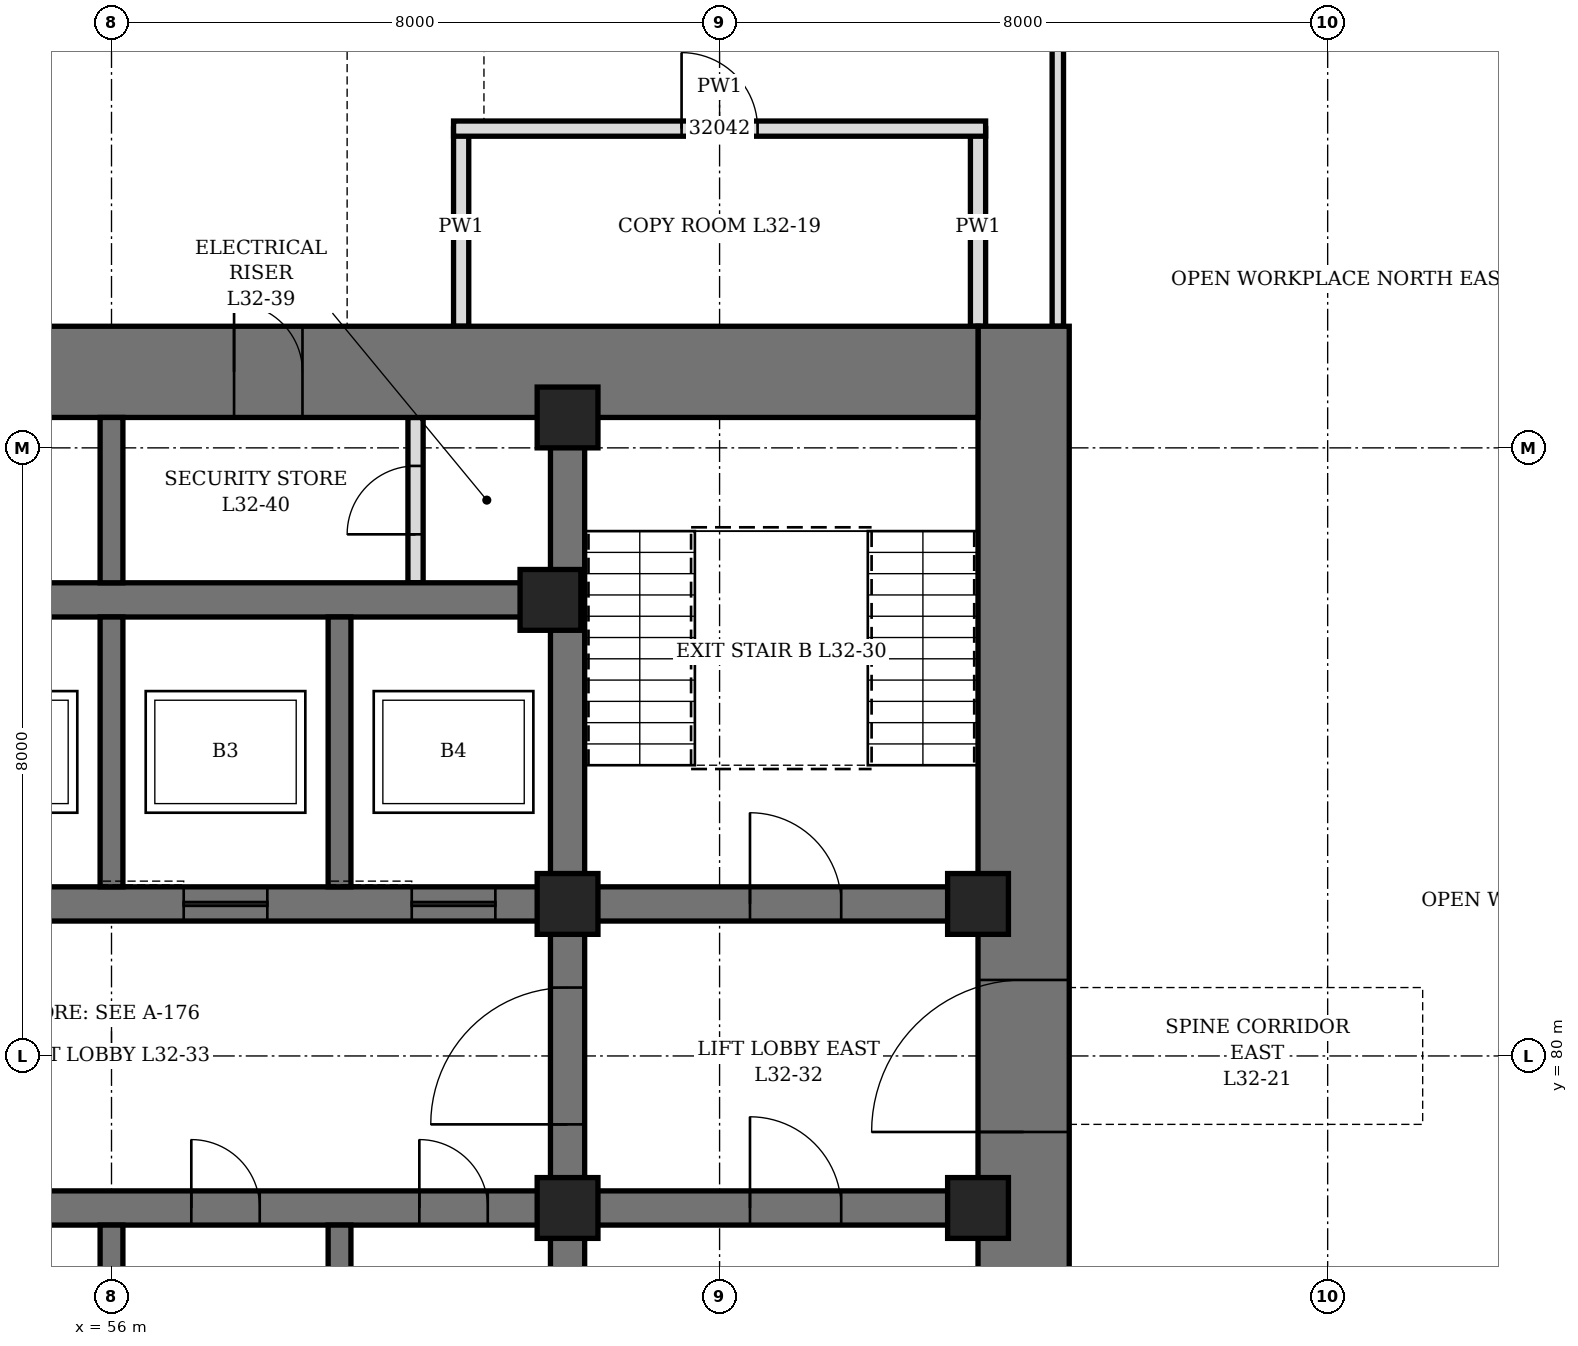
"""IFC4 building model, lengths in metres.
Left out: names, types, materials, properties, quantities, classifications, styles, units other than length and angle.
Written with IfcOpenShell. Run it as: python <this file> out.ifc"""

import sys

from ifc_helpers import new_model, si_unit, direction, frame, frame_2d, origin, origin_2d, place, context, subcontext, project, spatial, rectangle, hollow_rectangle, extrude, element, fill, save


model = new_model("IFC4")
c1 = context("Model", 3, precision=1e-05, world=origin(), true_north=direction((0.0, 1.0)))
c2 = subcontext(c1, "Body", "Model", "MODEL_VIEW")
j1 = project(units=[si_unit("LENGTHUNIT", "METRE"), si_unit("PLANEANGLEUNIT", "RADIAN")], contexts=[c1])
p1 = place(None, origin())
s1 = spatial("IfcSite", under=j1, at=p1, CompositionType="ELEMENT")
p2 = place(p1, origin())
s2 = spatial("IfcBuilding", under=s1, at=p2, CompositionType="ELEMENT")
p3 = place(p2, frame((0.0, 0.0, 145.9)))
s3 = spatial("IfcBuildingStorey", under=s2, at=p3, CompositionType="ELEMENT", Elevation=145.9)
p4 = place(p3, frame((68.0, 70.4, 0.0), z_axis=(0.0, 0.0, 1.0), x_axis=(0.0, 1.0, 0.0)))
e1 = element("IfcWall", 1, at=p4, inside=s3, PredefinedType="SHEAR", context=c2, shape_type="SweptSolid", body=[
    extrude(rectangle(XDim=19.2, YDim=1.2, at=frame_2d((9.6, 0.0))), origin(), (0.0, 0.0, 1.0), 4.2),
])
p5 = place(p4, frame((8.6, 0.0, 0.0)))
e2 = element("IfcOpeningElement", 2, at=p5, cuts=e1, PredefinedType="OPENING", context=c2, shape_type="SweptSolid", body=[
    extrude(rectangle(XDim=2.0, YDim=2.4, at=frame_2d((1.0, 1.2))), frame((0.0, 0.61, 0.0), z_axis=(0.0, -1.0, 0.0), x_axis=(1.0, 0.0, 0.0)), (0.0, 0.0, 1.0), 1.22),
])
p6 = place(p3, frame((44.6, 89.0, 0.0), z_axis=(0.0, 0.0, 1.0), x_axis=(1.0, 0.0, 0.0)))
e3 = element("IfcWall", 3, at=p6, inside=s3, PredefinedType="SHEAR", context=c2, shape_type="SweptSolid", body=[
    extrude(rectangle(XDim=22.8, YDim=1.2, at=frame_2d((11.4, 0.0))), origin(), (0.0, 0.0, 1.0), 4.2),
])
p7 = place(p6, frame((7.9, 0.0, 0.0)))
e4 = element("IfcOpeningElement", 4, at=p7, cuts=e3, PredefinedType="OPENING", context=c2, shape_type="SweptSolid", body=[
    extrude(rectangle(XDim=1.0, YDim=2.1, at=frame_2d((0.5, 1.05))), frame((0.0, 0.61, 0.0), z_axis=(0.0, -1.0, 0.0), x_axis=(1.0, 0.0, 0.0)), (0.0, 0.0, 1.0), 1.22),
])
p8 = place(p6, frame((13.012, 0.0, 0.0)))
e5 = element("IfcOpeningElement", 5, at=p8, cuts=e3, PredefinedType="OPENING", context=c2, shape_type="SweptSolid", body=[
    extrude(rectangle(XDim=0.9, YDim=2.1, at=frame_2d((0.45, 1.05))), frame((0.0, 0.61, 0.0), z_axis=(0.0, -1.0, 0.0), x_axis=(1.0, 0.0, 0.0)), (0.0, 0.0, 1.0), 1.22),
])
p9 = place(p3, frame((62.0, 71.6, 0.0), z_axis=(0.0, 0.0, 1.0), x_axis=(0.0, 1.0, 0.0)))
e6 = element("IfcWall", 6, at=p9, inside=s3, PredefinedType="SHEAR", context=c2, shape_type="SweptSolid", body=[
    extrude(rectangle(XDim=16.8, YDim=0.45, at=frame_2d((8.4, 0.0))), origin(), (0.0, 0.0, 1.0), 4.2),
])
p10 = place(p9, frame((7.5, 0.0, 0.0)))
e7 = element("IfcOpeningElement", 7, at=p10, cuts=e6, PredefinedType="OPENING", context=c2, shape_type="SweptSolid", body=[
    extrude(rectangle(XDim=1.8, YDim=2.4, at=frame_2d((0.9, 1.2))), frame((0.0, 0.235, 0.0), z_axis=(0.0, -1.0, 0.0), x_axis=(1.0, 0.0, 0.0)), (0.0, 0.0, 1.0), 0.47),
])
p11 = place(p3, frame((62.225, 78.0, 0.0), z_axis=(0.0, 0.0, 1.0), x_axis=(1.0, 0.0, 0.0)))
e8 = element("IfcWall", 8, at=p11, inside=s3, PredefinedType="SHEAR", context=c2, shape_type="SweptSolid", body=[
    extrude(rectangle(XDim=5.175, YDim=0.45, at=frame_2d((2.587, 0.0))), origin(), (0.0, 0.0, 1.0), 4.2),
])
p12 = place(p11, frame((2.175, 0.0, 0.0)))
e9 = element("IfcOpeningElement", 9, at=p12, cuts=e8, PredefinedType="OPENING", context=c2, shape_type="SweptSolid", body=[
    extrude(rectangle(XDim=1.2, YDim=2.1, at=frame_2d((0.6, 1.05))), frame((0.0, 0.235, 0.0), z_axis=(0.0, -1.0, 0.0), x_axis=(1.0, 0.0, 0.0)), (0.0, 0.0, 1.0), 0.47),
])
p13 = place(p3, frame((62.225, 82.0, 0.0), z_axis=(0.0, 0.0, 1.0), x_axis=(1.0, 0.0, 0.0)))
e10 = element("IfcWall", 10, at=p13, inside=s3, PredefinedType="SHEAR", context=c2, shape_type="SweptSolid", body=[
    extrude(rectangle(XDim=5.175, YDim=0.45, at=frame_2d((2.587, 0.0))), origin(), (0.0, 0.0, 1.0), 4.2),
])
p14 = place(p13, frame((2.175, 0.0, 0.0)))
e11 = element("IfcOpeningElement", 11, at=p14, cuts=e10, PredefinedType="OPENING", context=c2, shape_type="SweptSolid", body=[
    extrude(rectangle(XDim=1.2, YDim=2.1, at=frame_2d((0.6, 1.05))), frame((0.0, 0.235, 0.0), z_axis=(0.0, -1.0, 0.0), x_axis=(1.0, 0.0, 0.0)), (0.0, 0.0, 1.0), 0.47),
])
p15 = place(p3, frame((50.225, 78.0, 0.0), z_axis=(0.0, 0.0, 1.0), x_axis=(1.0, 0.0, 0.0)))
e12 = element("IfcWall", 12, at=p15, inside=s3, PredefinedType="SHEAR", context=c2, shape_type="SweptSolid", body=[
    extrude(rectangle(XDim=11.55, YDim=0.45, at=frame_2d((5.775, 0.0))), origin(), (0.0, 0.0, 1.0), 4.2),
])
p16 = place(p15, frame((0.825, 0.0, 0.0)))
e13 = element("IfcOpeningElement", 13, at=p16, cuts=e12, PredefinedType="OPENING", context=c2, shape_type="SweptSolid", body=[
    extrude(rectangle(XDim=0.9, YDim=2.1, at=frame_2d((0.45, 1.05))), frame((0.0, 0.235, 0.0), z_axis=(0.0, -1.0, 0.0), x_axis=(1.0, 0.0, 0.0)), (0.0, 0.0, 1.0), 0.47),
])
p17 = place(p15, frame((3.825, 0.0, 0.0)))
e14 = element("IfcOpeningElement", 14, at=p17, cuts=e12, PredefinedType="OPENING", context=c2, shape_type="SweptSolid", body=[
    extrude(rectangle(XDim=0.9, YDim=2.1, at=frame_2d((0.45, 1.05))), frame((0.0, 0.235, 0.0), z_axis=(0.0, -1.0, 0.0), x_axis=(1.0, 0.0, 0.0)), (0.0, 0.0, 1.0), 0.47),
])
p18 = place(p15, frame((6.825, 0.0, 0.0)))
e15 = element("IfcOpeningElement", 15, at=p18, cuts=e12, PredefinedType="OPENING", context=c2, shape_type="SweptSolid", body=[
    extrude(rectangle(XDim=0.9, YDim=2.1, at=frame_2d((0.45, 1.05))), frame((0.0, 0.235, 0.0), z_axis=(0.0, -1.0, 0.0), x_axis=(1.0, 0.0, 0.0)), (0.0, 0.0, 1.0), 0.47),
])
p19 = place(p15, frame((9.825, 0.0, 0.0)))
e16 = element("IfcOpeningElement", 16, at=p19, cuts=e12, PredefinedType="OPENING", context=c2, shape_type="SweptSolid", body=[
    extrude(rectangle(XDim=0.9, YDim=2.1, at=frame_2d((0.45, 1.05))), frame((0.0, 0.235, 0.0), z_axis=(0.0, -1.0, 0.0), x_axis=(1.0, 0.0, 0.0)), (0.0, 0.0, 1.0), 0.47),
])
p20 = place(p3, frame((50.225, 82.0, 0.0), z_axis=(0.0, 0.0, 1.0), x_axis=(1.0, 0.0, 0.0)))
e17 = element("IfcWall", 17, at=p20, inside=s3, PredefinedType="SHEAR", context=c2, shape_type="SweptSolid", body=[
    extrude(rectangle(XDim=11.55, YDim=0.45, at=frame_2d((5.775, 0.0))), origin(), (0.0, 0.0, 1.0), 4.2),
])
p21 = place(p20, frame((0.725, 0.0, 0.0)))
e18 = element("IfcOpeningElement", 18, at=p21, cuts=e17, PredefinedType="OPENING", context=c2, shape_type="SweptSolid", body=[
    extrude(rectangle(XDim=1.1, YDim=2.2, at=frame_2d((0.55, 1.1))), frame((0.0, 0.235, 0.0), z_axis=(0.0, -1.0, 0.0), x_axis=(1.0, 0.0, 0.0)), (0.0, 0.0, 1.0), 0.47),
])
p22 = place(p20, frame((3.725, 0.0, 0.0)))
e19 = element("IfcOpeningElement", 19, at=p22, cuts=e17, PredefinedType="OPENING", context=c2, shape_type="SweptSolid", body=[
    extrude(rectangle(XDim=1.1, YDim=2.2, at=frame_2d((0.55, 1.1))), frame((0.0, 0.235, 0.0), z_axis=(0.0, -1.0, 0.0), x_axis=(1.0, 0.0, 0.0)), (0.0, 0.0, 1.0), 0.47),
])
p23 = place(p20, frame((6.725, 0.0, 0.0)))
e20 = element("IfcOpeningElement", 20, at=p23, cuts=e17, PredefinedType="OPENING", context=c2, shape_type="SweptSolid", body=[
    extrude(rectangle(XDim=1.1, YDim=2.2, at=frame_2d((0.55, 1.1))), frame((0.0, 0.235, 0.0), z_axis=(0.0, -1.0, 0.0), x_axis=(1.0, 0.0, 0.0)), (0.0, 0.0, 1.0), 0.47),
])
p24 = place(p20, frame((9.725, 0.0, 0.0)))
e21 = element("IfcOpeningElement", 21, at=p24, cuts=e17, PredefinedType="OPENING", context=c2, shape_type="SweptSolid", body=[
    extrude(rectangle(XDim=1.1, YDim=2.2, at=frame_2d((0.55, 1.1))), frame((0.0, 0.235, 0.0), z_axis=(0.0, -1.0, 0.0), x_axis=(1.0, 0.0, 0.0)), (0.0, 0.0, 1.0), 0.47),
])
p25 = place(p3, frame((50.225, 86.0, 0.0), z_axis=(0.0, 0.0, 1.0), x_axis=(1.0, 0.0, 0.0)))
e22 = element("IfcWall", 22, at=p25, inside=s3, PredefinedType="SHEAR", context=c2, shape_type="SweptSolid", body=[
    extrude(rectangle(XDim=11.55, YDim=0.45, at=frame_2d((5.775, 0.0))), origin(), (0.0, 0.0, 1.0), 4.2),
])
p26 = place(p3, frame((56.0, 74.15, 0.0), z_axis=(0.0, 0.0, 1.0), x_axis=(0.0, 1.0, 0.0)))
e23 = element("IfcWall", 23, at=p26, inside=s3, PredefinedType="SHEAR", context=c2, shape_type="SweptSolid", body=[
    extrude(rectangle(XDim=3.625, YDim=0.3, at=frame_2d((1.812, 0.0))), origin(), (0.0, 0.0, 1.0), 4.2),
])
p27 = place(p3, frame((56.0, 82.225, 0.0), z_axis=(0.0, 0.0, 1.0), x_axis=(0.0, 1.0, 0.0)))
e24 = element("IfcWall", 24, at=p27, inside=s3, PredefinedType="SHEAR", context=c2, shape_type="SweptSolid", body=[
    extrude(rectangle(XDim=3.55, YDim=0.3, at=frame_2d((1.775, 0.0))), origin(), (0.0, 0.0, 1.0), 4.2),
])
p28 = place(p3, frame((59.0, 74.15, 0.0), z_axis=(0.0, 0.0, 1.0), x_axis=(0.0, 1.0, 0.0)))
e25 = element("IfcWall", 25, at=p28, inside=s3, PredefinedType="SHEAR", context=c2, shape_type="SweptSolid", body=[
    extrude(rectangle(XDim=3.625, YDim=0.3, at=frame_2d((1.812, 0.0))), origin(), (0.0, 0.0, 1.0), 4.2),
])
p29 = place(p3, frame((59.0, 82.225, 0.0), z_axis=(0.0, 0.0, 1.0), x_axis=(0.0, 1.0, 0.0)))
e26 = element("IfcWall", 26, at=p29, inside=s3, PredefinedType="SHEAR", context=c2, shape_type="SweptSolid", body=[
    extrude(rectangle(XDim=3.55, YDim=0.3, at=frame_2d((1.775, 0.0))), origin(), (0.0, 0.0, 1.0), 4.2),
])
p30 = place(p3, frame((56.0, 86.225, 0.0), z_axis=(0.0, 0.0, 1.0), x_axis=(0.0, 1.0, 0.0)))
e27 = element("IfcWall", 27, at=p30, inside=s3, PredefinedType="SHEAR", context=c2, shape_type="SweptSolid", body=[
    extrude(rectangle(XDim=2.175, YDim=0.3, at=frame_2d((1.087, 0.0))), origin(), (0.0, 0.0, 1.0), 4.2),
])
for number, where, z_axis, x_axis in (
    (28, (61.775, 86.0, 0.0), (0.0, 0.0, 1.0), (1.0, 0.0, 0.0)),
    (29, (62.0, 78.0, 0.0), (0.0, 0.0, 1.0), (1.0, 0.0, 0.0)),
    (30, (62.0, 82.0, 0.0), (0.0, 0.0, 1.0), (1.0, 0.0, 0.0)),
    (31, (62.0, 88.4, 0.0), (0.0, 0.0, 1.0), (1.0, 0.0, 0.0)),
    (32, (67.4, 78.0, 0.0), (0.0, 0.0, 1.0), (1.0, 0.0, 0.0)),
    (33, (67.4, 82.0, 0.0), (0.0, 0.0, 1.0), (1.0, 0.0, 0.0)),
):
    element("IfcColumn", number, at=place(p3, frame(where, z_axis=z_axis, x_axis=x_axis)), inside=s3, PredefinedType="COLUMN", context=c2, shape_type="SweptSolid", body=[
        extrude(hollow_rectangle(XDim=0.8, YDim=0.8, WallThickness=0.1, at=origin_2d()), origin(), (0.0, 0.0, 1.0), 4.2),
    ])
p31 = place(p3, frame((60.0, 86.225, 0.0), z_axis=(0.0, 0.0, 1.0), x_axis=(0.0, 1.0, 0.0)))
e34 = element("IfcWall", 34, at=p31, inside=s3, PredefinedType="PARTITIONING", context=c2, shape_type="SweptSolid", body=[
    extrude(rectangle(XDim=2.175, YDim=0.2, at=frame_2d((1.087, 0.0))), origin(), (0.0, 0.0, 1.0), 4.04),
])
p32 = place(p31, frame((0.637, 0.0, 0.0)))
e35 = element("IfcOpeningElement", 35, at=p32, cuts=e34, PredefinedType="OPENING", context=c2, shape_type="SweptSolid", body=[
    extrude(rectangle(XDim=0.9, YDim=2.1, at=frame_2d((0.45, 1.05))), frame((0.0, 0.11, 0.0), z_axis=(0.0, -1.0, 0.0), x_axis=(1.0, 0.0, 0.0)), (0.0, 0.0, 1.0), 0.22),
])
p33 = place(p3, frame((60.6, 89.6, 0.0), z_axis=(0.0, 0.0, 1.0), x_axis=(0.0, 1.0, 0.0)))
e36 = element("IfcWall", 36, at=p33, inside=s3, PredefinedType="PARTITIONING", context=c2, shape_type="SweptSolid", body=[
    extrude(rectangle(XDim=2.6, YDim=0.2, at=frame_2d((1.3, 0.0))), origin(), (0.0, 0.0, 1.0), 4.04),
])
p34 = place(p3, frame((67.4, 89.6, 0.0), z_axis=(0.0, 0.0, 1.0), x_axis=(0.0, 1.0, 0.0)))
e37 = element("IfcWall", 37, at=p34, inside=s3, PredefinedType="PARTITIONING", context=c2, shape_type="SweptSolid", body=[
    extrude(rectangle(XDim=2.6, YDim=0.2, at=frame_2d((1.3, 0.0))), origin(), (0.0, 0.0, 1.0), 2.74),
])
p35 = place(p3, frame((60.5, 92.2, 0.0), z_axis=(0.0, 0.0, 1.0), x_axis=(1.0, 0.0, 0.0)))
e38 = element("IfcWall", 38, at=p35, inside=s3, PredefinedType="PARTITIONING", context=c2, shape_type="SweptSolid", body=[
    extrude(rectangle(XDim=7.0, YDim=0.2, at=frame_2d((3.5, 0.0))), origin(), (0.0, 0.0, 1.0), 4.04),
])
p36 = place(p35, frame((3.0, 0.0, 0.0)))
e39 = element("IfcOpeningElement", 39, at=p36, cuts=e38, PredefinedType="OPENING", context=c2, shape_type="SweptSolid", body=[
    extrude(rectangle(XDim=1.0, YDim=2.1, at=frame_2d((0.5, 1.05))), frame((0.0, 0.11, 0.0), z_axis=(0.0, -1.0, 0.0), x_axis=(1.0, 0.0, 0.0)), (0.0, 0.0, 1.0), 0.22),
])
p37 = place(p3, frame((68.45, 89.6, 0.0), z_axis=(0.0, 0.0, 1.0), x_axis=(0.0, 1.0, 0.0)))
e40 = element("IfcWall", 40, at=p37, inside=s3, PredefinedType="PARTITIONING", context=c2, shape_type="SweptSolid", body=[
    extrude(rectangle(XDim=13.59, YDim=0.15, at=frame_2d((6.795, 0.0))), origin(), (0.0, 0.0, 1.0), 4.04),
])
p38 = place(p37, frame((6.295, 0.0, 0.0)))
e41 = element("IfcOpeningElement", 41, at=p38, cuts=e40, PredefinedType="OPENING", context=c2, shape_type="SweptSolid", body=[
    extrude(rectangle(XDim=1.0, YDim=2.4, at=frame_2d((0.5, 1.2))), frame((0.0, 0.085, 0.0), z_axis=(0.0, -1.0, 0.0), x_axis=(1.0, 0.0, 0.0)), (0.0, 0.0, 1.0), 0.17),
])
p39 = place(p8, origin())
e42 = element("IfcDoor", 42, at=p39, inside=s3, OperationType="SINGLE_SWING_LEFT", PredefinedType="DOOR", context=c2, shape_type="SweptSolid", body=[
    extrude(rectangle(XDim=0.9, YDim=2.1, at=frame_2d((0.45, 1.05))), frame((0.0, 0.35, 0.0), z_axis=(0.0, -1.0, 0.0), x_axis=(1.0, 0.0, 0.0)), (0.0, 0.0, 1.0), 0.7),
])
fill(e5, e42)
p40 = place(p32, origin())
e43 = element("IfcDoor", 43, at=p40, inside=s3, OperationType="SINGLE_SWING_LEFT", PredefinedType="DOOR", context=c2, shape_type="SweptSolid", body=[
    extrude(rectangle(XDim=0.9, YDim=2.1, at=frame_2d((0.45, 1.05))), frame((0.0, 0.1, 0.0), z_axis=(0.0, -1.0, 0.0), x_axis=(1.0, 0.0, 0.0)), (0.0, 0.0, 1.0), 0.199),
])
fill(e35, e43)
p41 = place(p18, origin())
e44 = element("IfcDoor", 44, at=p41, inside=s3, OperationType="SINGLE_SWING_LEFT", PredefinedType="DOOR", context=c2, shape_type="SweptSolid", body=[
    extrude(rectangle(XDim=0.9, YDim=2.1, at=frame_2d((0.45, 1.05))), frame((0.0, 0.225, 0.0), z_axis=(0.0, -1.0, 0.0), x_axis=(1.0, 0.0, 0.0)), (0.0, 0.0, 1.0), 0.449),
])
fill(e15, e44)
p42 = place(p19, origin())
e45 = element("IfcDoor", 45, at=p42, inside=s3, OperationType="SINGLE_SWING_LEFT", PredefinedType="DOOR", context=c2, shape_type="SweptSolid", body=[
    extrude(rectangle(XDim=0.9, YDim=2.1, at=frame_2d((0.45, 1.05))), frame((0.0, 0.225, 0.0), z_axis=(0.0, -1.0, 0.0), x_axis=(1.0, 0.0, 0.0)), (0.0, 0.0, 1.0), 0.449),
])
fill(e16, e45)
p43 = place(p14, origin())
e46 = element("IfcDoor", 46, at=p43, inside=s3, OperationType="SINGLE_SWING_LEFT", PredefinedType="DOOR", context=c2, shape_type="SweptSolid", body=[
    extrude(rectangle(XDim=1.2, YDim=2.1, at=frame_2d((0.6, 1.05))), frame((0.0, 0.225, 0.0), z_axis=(0.0, -1.0, 0.0), x_axis=(1.0, 0.0, 0.0)), (0.0, 0.0, 1.0), 0.449),
])
fill(e11, e46)
p44 = place(p5, origin())
e47 = element("IfcDoor", 47, at=p44, inside=s3, OperationType="DOUBLE_DOOR_SINGLE_SWING", PredefinedType="DOOR", context=c2, shape_type="SweptSolid", body=[
    extrude(rectangle(XDim=2.0, YDim=2.4, at=frame_2d((1.0, 1.2))), frame((0.0, 0.35, 0.0), z_axis=(0.0, -1.0, 0.0), x_axis=(1.0, 0.0, 0.0)), (0.0, 0.0, 1.0), 0.7),
])
fill(e2, e47)
p45 = place(p10, origin())
e48 = element("IfcDoor", 48, at=p45, inside=s3, OperationType="DOUBLE_DOOR_SINGLE_SWING", PredefinedType="DOOR", context=c2, shape_type="SweptSolid", body=[
    extrude(rectangle(XDim=1.8, YDim=2.4, at=frame_2d((0.9, 1.2))), frame((0.0, 0.225, 0.0), z_axis=(0.0, -1.0, 0.0), x_axis=(1.0, 0.0, 0.0)), (0.0, 0.0, 1.0), 0.449),
])
fill(e7, e48)
p46 = place(p12, origin())
e49 = element("IfcDoor", 49, at=p46, inside=s3, OperationType="SINGLE_SWING_RIGHT", PredefinedType="DOOR", context=c2, shape_type="SweptSolid", body=[
    extrude(rectangle(XDim=1.2, YDim=2.1, at=frame_2d((0.6, 1.05))), frame((0.0, 0.225, 0.0), z_axis=(0.0, -1.0, 0.0), x_axis=(1.0, 0.0, 0.0)), (0.0, 0.0, 1.0), 0.449),
])
fill(e9, e49)
p47 = place(p23, origin())
e50 = element("IfcDoor", 50, at=p47, inside=s3, OperationType="SLIDING_TO_LEFT", PredefinedType="DOOR", context=c2, shape_type="SweptSolid", body=[
    extrude(rectangle(XDim=1.1, YDim=2.2, at=frame_2d((0.55, 1.1))), frame((0.0, 0.225, 0.0), z_axis=(0.0, -1.0, 0.0), x_axis=(1.0, 0.0, 0.0)), (0.0, 0.0, 1.0), 0.449),
])
fill(e20, e50)
p48 = place(p24, origin())
e51 = element("IfcDoor", 51, at=p48, inside=s3, OperationType="SLIDING_TO_LEFT", PredefinedType="DOOR", context=c2, shape_type="SweptSolid", body=[
    extrude(rectangle(XDim=1.1, YDim=2.2, at=frame_2d((0.55, 1.1))), frame((0.0, 0.225, 0.0), z_axis=(0.0, -1.0, 0.0), x_axis=(1.0, 0.0, 0.0)), (0.0, 0.0, 1.0), 0.449),
])
fill(e21, e51)
p49 = place(p36, origin())
e52 = element("IfcDoor", 52, at=p49, inside=s3, OperationType="SINGLE_SWING_LEFT", PredefinedType="DOOR", context=c2, shape_type="SweptSolid", body=[
    extrude(rectangle(XDim=1.0, YDim=2.1, at=frame_2d((0.5, 1.05))), frame((0.0, 0.1, 0.0), z_axis=(0.0, -1.0, 0.0), x_axis=(1.0, 0.0, 0.0)), (0.0, 0.0, 1.0), 0.199),
])
fill(e39, e52)
save(model, sys.argv[1])
